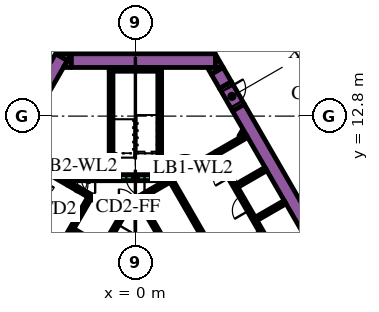
"""IFC4 building model, lengths in metres.
Left out: names, types, materials, properties, quantities, classifications, styles, units other than length and angle.
Written with IfcOpenShell. Run it as: python <this file> out.ifc"""

import sys

from ifc_helpers import new_model, si_unit, direction, frame, frame_2d, origin, place, context, subcontext, project, spatial, polyline, rectangle, outline, extrude, element, fill, save


model = new_model("IFC4")
c1 = context("Model", 3, precision=1e-05, world=origin(), true_north=direction((0.0, 1.0)))
c2 = subcontext(c1, "Body", "Model", "MODEL_VIEW")
j1 = project(units=[si_unit("LENGTHUNIT", "METRE"), si_unit("PLANEANGLEUNIT", "RADIAN")], contexts=[c1])
p1 = place(None, origin())
s1 = spatial("IfcSite", under=j1, at=p1, CompositionType="ELEMENT")
p2 = place(p1, origin())
s2 = spatial("IfcBuilding", under=s1, at=p2, CompositionType="ELEMENT")
p3 = place(p2, frame((0.0, 0.0, 21.6)))
s3 = spatial("IfcBuildingStorey", under=s2, at=p3, CompositionType="ELEMENT", Elevation=21.6)
p4 = place(p3, frame((6.776, 13.364, 0.0), z_axis=(0.0, 0.0, 1.0), x_axis=(0.500004177138, -0.8660229921, 0.0)))
e1 = element("IfcWall", 1, at=p4, inside=s3, PredefinedType="SOLIDWALL", context=c2, shape_type="SweptSolid", body=[
    extrude(rectangle(XDim=20.204, YDim=0.9, at=frame_2d((10.102, 0.0))), origin(), (0.0, 0.0, 1.0), 6.0),
])
p5 = place(p3, frame((-15.36, -1.503, 0.0), z_axis=(0.0, 0.0, 1.0), x_axis=(0.50000389221, 0.866023156604, 0.0)))
e2 = element("IfcWall", 2, at=p5, inside=s3, PredefinedType="SOLIDWALL", context=c2, shape_type="SweptSolid", body=[
    extrude(rectangle(XDim=21.0, YDim=0.9, at=frame_2d((10.5, 0.0))), origin(), (0.0, 0.0, 1.0), 6.0),
])
p6 = place(p3, origin())
e3 = element("IfcWall", 3, at=p6, inside=s3, PredefinedType="SOLIDWALL", context=c2, shape_type="SweptSolid", body=[
    extrude(outline(polyline([(-4.215, 16.9), (-4.469, 16.46), (-5.231, 16.9), (-4.215, 16.9)])), origin(), (0.0, 0.0, 1.0), 6.0),
])
p7 = place(p3, frame((-4.224, 16.45, 0.0), z_axis=(0.0, 0.0, 1.0), x_axis=(1.0, 0.0, 0.0)))
e4 = element("IfcWall", 4, at=p7, inside=s3, PredefinedType="SOLIDWALL", context=c2, shape_type="SweptSolid", body=[
    extrude(rectangle(XDim=9.488, YDim=0.9, at=frame_2d((4.744, 0.0))), origin(), (0.0, 0.0, 1.0), 6.0),
])
e5 = element("IfcWall", 5, at=p6, inside=s3, PredefinedType="SOLIDWALL", context=c2, shape_type="SweptSolid", body=[
    extrude(outline(polyline([(5.265, 16.0), (5.265, 16.88), (5.773, 16.0), (5.265, 16.0)])), origin(), (0.0, 0.0, 1.0), 6.0),
])
e6 = element("IfcWall", 6, at=p6, inside=s3, PredefinedType="SOLIDWALL", context=c2, shape_type="SweptSolid", body=[
    extrude(outline(polyline([(-4.734, 16.0), (-4.226, 16.88), (-4.226, 16.0), (-4.734, 16.0)])), origin(), (0.0, 0.0, 1.0), 6.0),
])
p8 = place(p3, frame((5.926, 14.836, 0.0), z_axis=(0.0, 0.0, 1.0), x_axis=(-0.500076735116, 0.865981096212, 0.0)))
e7 = element("IfcWall", 7, at=p8, inside=s3, PredefinedType="SOLIDWALL", context=c2, shape_type="SweptSolid", body=[
    extrude(rectangle(XDim=1.094, YDim=0.9, at=frame_2d((0.547, 0.0))), origin(), (0.0, 0.0, 1.0), 6.0),
])
e8 = element("IfcWall", 8, at=p6, inside=s3, PredefinedType="SOLIDWALL", context=c2, shape_type="SweptSolid", body=[
    extrude(outline(polyline([(4.734, 16.0), (5.75, 16.0), (4.988, 15.56), (4.734, 16.0)])), origin(), (0.0, 0.0, 1.0), 6.0),
])
p9 = place(p3, frame((-1.725, 15.875, 0.0), z_axis=(0.0, 0.0, 1.0), x_axis=(1.0, 0.0, 0.0)))
e9 = element("IfcWall", 9, at=p9, inside=s3, PredefinedType="SOLIDWALL", context=c2, shape_type="SweptSolid", body=[
    extrude(rectangle(XDim=3.45, YDim=0.25, at=frame_2d((1.725, 0.0))), origin(), (0.0, 0.0, 1.0), 6.0),
])
p10 = place(p3, frame((1.6, 8.95, 0.0), z_axis=(0.0, 0.0, 1.0), x_axis=(0.0, 1.0, 0.0)))
e10 = element("IfcWall", 10, at=p10, inside=s3, PredefinedType="SOLIDWALL", context=c2, shape_type="SweptSolid", body=[
    extrude(rectangle(XDim=6.8, YDim=0.25, at=frame_2d((3.4, 0.0))), origin(), (0.0, 0.0, 1.0), 6.0),
])
p11 = place(p3, frame((1.05, 8.825, 0.0), z_axis=(0.0, 0.0, 1.0), x_axis=(1.0, 0.0, 0.0)))
e11 = element("IfcWall", 11, at=p11, inside=s3, PredefinedType="SOLIDWALL", context=c2, shape_type="SweptSolid", body=[
    extrude(rectangle(XDim=0.675, YDim=0.25, at=frame_2d((0.337, 0.0))), origin(), (0.0, 0.0, 1.0), 6.0),
])
p12 = place(p3, frame((-1.6, 8.7, 0.0), z_axis=(0.0, 0.0, 1.0), x_axis=(0.0, 1.0, 0.0)))
e12 = element("IfcWall", 12, at=p12, inside=s3, PredefinedType="SOLIDWALL", context=c2, shape_type="SweptSolid", body=[
    extrude(rectangle(XDim=7.05, YDim=0.25, at=frame_2d((3.525, 0.0))), origin(), (0.0, 0.0, 1.0), 6.0),
])
p13 = place(p3, frame((-1.475, 8.825, 0.0), z_axis=(0.0, 0.0, 1.0), x_axis=(1.0, 0.0, 0.0)))
e13 = element("IfcWall", 13, at=p13, inside=s3, PredefinedType="SOLIDWALL", context=c2, shape_type="SweptSolid", body=[
    extrude(rectangle(XDim=0.425, YDim=0.25, at=frame_2d((0.212, 0.0))), origin(), (0.0, 0.0, 1.0), 6.0),
])
e14 = element("IfcWall", 14, at=p6, inside=s3, PredefinedType="SOLIDWALL", context=c2, shape_type="SweptSolid", body=[
    extrude(outline(polyline([(0.566, 6.725), (0.566, 6.875), (0.566, 6.875), (0.565, 6.875), (0.361, 6.875), (0.035, 7.439), (0.252, 7.564), (0.377, 7.348), (6.552, -3.348), (6.677, -3.564), (6.46, -3.689), (0.448, 6.725), (0.565, 6.725), (0.566, 6.725), (0.566, 6.725)])), origin(), (0.0, 0.0, 1.0), 6.0),
])
p14 = place(p3, frame((4.358, 9.791, 0.0), z_axis=(0.0, 0.0, 1.0), x_axis=(0.866079547155, 0.499906209203, 0.0)))
e15 = element("IfcWall", 15, at=p14, inside=s3, PredefinedType="SOLIDWALL", context=c2, shape_type="SweptSolid", body=[
    extrude(rectangle(XDim=1.15, YDim=0.25, at=frame_2d((0.575, 0.0))), origin(), (0.0, 0.0, 1.0), 6.0),
])
p15 = place(p3, frame((5.356, 10.367, 0.0), z_axis=(0.0, 0.0, 1.0), x_axis=(0.865978535641, 0.50008116922, 0.0)))
e16 = element("IfcWall", 16, at=p15, inside=s3, PredefinedType="SOLIDWALL", context=c2, shape_type="SweptSolid", body=[
    extrude(rectangle(XDim=2.278, YDim=0.25, at=frame_2d((1.139, 0.0))), origin(), (0.0, 0.0, 1.0), 6.0),
])
p16 = place(p3, frame((0.314, 7.456, 0.0), z_axis=(0.0, 0.0, 1.0), x_axis=(0.866013897511, 0.50001992892, 0.0)))
e17 = element("IfcWall", 17, at=p16, inside=s3, PredefinedType="SOLIDWALL", context=c2, shape_type="SweptSolid", body=[
    extrude(rectangle(XDim=3.268, YDim=0.25, at=frame_2d((1.634, 0.0))), origin(), (0.0, 0.0, 1.0), 6.0),
])
for number, where, z_axis, x_axis in (
    (18, (6.684, 8.224, 0.0), (0.0, 0.0, 1.0), (0.866, 0.5, 0.0)),
    (19, (7.944, 6.041, 0.0), (0.0, 0.0, 1.0), (0.866, 0.5, 0.0)),
):
    element("IfcWall", number, at=place(p3, frame(where, z_axis=z_axis, x_axis=x_axis)), inside=s3, PredefinedType="SOLIDWALL", context=c2, shape_type="SweptSolid", body=[
        extrude(rectangle(XDim=2.2, YDim=0.25, at=frame_2d((1.1, 0.0))), origin(), (0.0, 0.0, 1.0), 6.0),
    ])
p17 = place(p3, frame((-8.06, -1.311, 0.0), z_axis=(0.0, 0.0, 1.0), x_axis=(0.50000273126, 0.866023826885, 0.0)))
e20 = element("IfcWall", 20, at=p17, inside=s3, PredefinedType="SOLIDWALL", context=c2, shape_type="SweptSolid", body=[
    extrude(rectangle(XDim=10.33, YDim=0.25, at=frame_2d((5.165, 0.0))), origin(), (0.0, 0.0, 1.0), 6.0),
])
p18 = place(p3, frame((-1.758, 6.835, 0.0), z_axis=(0.0, 0.0, 1.0), x_axis=(0.865982457891, -0.500074377092, 0.0)))
e21 = element("IfcWall", 21, at=p18, inside=s3, PredefinedType="SOLIDWALL", context=c2, shape_type="SweptSolid", body=[
    extrude(rectangle(XDim=0.2, YDim=0.25, at=frame_2d((0.1, 0.0))), origin(), (0.0, 0.0, 1.0), 6.0),
])
p19 = place(p3, frame((-1.76, 6.836, 0.0), z_axis=(0.0, 0.0, 1.0), x_axis=(-0.865952863304, 0.500125622755, 0.0)))
e22 = element("IfcWall", 22, at=p19, inside=s3, PredefinedType="SOLIDWALL", context=c2, shape_type="SweptSolid", body=[
    extrude(rectangle(XDim=1.258, YDim=0.25, at=frame_2d((0.629, 0.0))), origin(), (0.0, 0.0, 1.0), 6.0),
])
p20 = place(p3, frame((-0.728, 6.24, 0.0), z_axis=(0.0, 0.0, 1.0), x_axis=(-0.865955664968, 0.500120771724, 0.0)))
e23 = element("IfcWall", 23, at=p20, inside=s3, PredefinedType="SOLIDWALL", context=c2, shape_type="SweptSolid", body=[
    extrude(rectangle(XDim=0.778, YDim=0.25, at=frame_2d((0.389, 0.0))), origin(), (0.0, 0.0, 1.0), 6.0),
])
p21 = place(p3, frame((-2.204, 4.182, 0.0), z_axis=(0.0, 0.0, 1.0), x_axis=(-0.866008176907, 0.50002983664, 0.0)))
e24 = element("IfcWall", 24, at=p21, inside=s3, PredefinedType="SOLIDWALL", context=c2, shape_type="SweptSolid", body=[
    extrude(rectangle(XDim=2.2, YDim=0.25, at=frame_2d((1.1, 0.0))), origin(), (0.0, 0.0, 1.0), 6.0),
])
e25 = element("IfcWall", 25, at=p6, inside=s3, PredefinedType="SOLIDWALL", context=c2, shape_type="SweptSolid", body=[
    extrude(outline(polyline([(-3.128, 7.481), (-3.259, 7.557), (-3.134, 7.773), (-3.003, 7.698), (-3.128, 7.481)])), origin(), (0.0, 0.0, 1.0), 6.0),
])
p22 = place(p3, frame((-7.959, 10.415, 0.0), z_axis=(0.0, 0.0, 1.0), x_axis=(0.866020958405, -0.500007699544, 0.0)))
e26 = element("IfcWall", 26, at=p22, inside=s3, PredefinedType="SOLIDWALL", context=c2, shape_type="SweptSolid", body=[
    extrude(rectangle(XDim=4.1, YDim=0.25, at=frame_2d((2.05, 0.0))), origin(), (0.0, 0.0, 1.0), 6.0),
])
p23 = place(p3, frame((-3.997, 8.625, 0.0), z_axis=(0.0, 0.0, 1.0), x_axis=(-1.0, 0.0, 0.0)))
e27 = element("IfcWall", 27, at=p23, inside=s3, PredefinedType="PARTITIONING", context=c2, shape_type="SweptSolid", body=[
    extrude(rectangle(XDim=0.502, YDim=0.15, at=frame_2d((0.251, 0.0))), origin(), (0.0, 0.0, 1.0), 4.85),
])
p24 = place(p3, frame((-2.196, 8.625, 0.0), z_axis=(0.0, 0.0, 1.0), x_axis=(1.0, 0.0, 0.0)))
e28 = element("IfcWall", 28, at=p24, inside=s3, PredefinedType="PARTITIONING", context=c2, shape_type="SweptSolid", body=[
    extrude(rectangle(XDim=1.146, YDim=0.15, at=frame_2d((0.573, 0.0))), origin(), (0.0, 0.0, 1.0), 4.85),
])
p25 = place(p3, frame((1.05, 8.625, 0.0), z_axis=(0.0, 0.0, 1.0), x_axis=(1.0, 0.0, 0.0)))
e29 = element("IfcWall", 29, at=p25, inside=s3, PredefinedType="PARTITIONING", context=c2, shape_type="SweptSolid", body=[
    extrude(rectangle(XDim=0.514, YDim=0.15, at=frame_2d((0.257, 0.0))), origin(), (0.0, 0.0, 1.0), 4.85),
])
p26 = place(p3, frame((6.872, 11.45, 0.0), z_axis=(0.0, 0.0, 1.0), x_axis=(0.499846793097, 0.866113839764, 0.0)))
e30 = element("IfcWall", 30, at=p26, inside=s3, PredefinedType="PARTITIONING", context=c2, shape_type="SweptSolid", body=[
    extrude(rectangle(XDim=0.453, YDim=0.15, at=frame_2d((0.227, 0.0))), origin(), (0.0, 0.0, 1.0), 4.85),
])
p27 = place(p3, frame((7.131, 11.6, 0.0), z_axis=(0.0, 0.0, 1.0), x_axis=(0.498600033135, 0.866832167699, 0.0)))
e31 = element("IfcWall", 31, at=p27, inside=s3, PredefinedType="PARTITIONING", context=c2, shape_type="SweptSolid", body=[
    extrude(rectangle(XDim=0.107, YDim=0.15, at=frame_2d((0.053, 0.0))), origin(), (0.0, 0.0, 1.0), 4.85),
])
p28 = place(p3, frame((11.553, -0.46, 0.0), z_axis=(0.0, 0.0, 1.0), x_axis=(-0.500006514828, 0.866021642414, 0.0)))
e32 = element("IfcWall", 32, at=p28, inside=s3, PredefinedType="SOLIDWALL", context=c2, shape_type="SweptSolid", body=[
    extrude(rectangle(XDim=12.35, YDim=0.25, at=frame_2d((6.175, 0.0))), origin(), (0.0, 0.0, 1.0), 6.0),
])
p29 = place(p28, frame((0.585, 0.0, 0.0)))
e33 = element("IfcOpeningElement", 33, at=p29, cuts=e32, PredefinedType="OPENING", context=c2, shape_type="SweptSolid", body=[
    extrude(rectangle(XDim=1.1, YDim=2.1, at=frame_2d((0.55, 1.05))), frame((0.0, 0.135, 0.0), z_axis=(0.0, -1.0, 0.0), x_axis=(1.0, 0.0, 0.0)), (0.0, 0.0, 1.0), 0.27),
])
p30 = place(p28, frame((3.105, 0.0, 0.0)))
e34 = element("IfcOpeningElement", 34, at=p30, cuts=e32, PredefinedType="OPENING", context=c2, shape_type="SweptSolid", body=[
    extrude(rectangle(XDim=1.1, YDim=2.1, at=frame_2d((0.55, 1.05))), frame((0.0, 0.135, 0.0), z_axis=(0.0, -1.0, 0.0), x_axis=(1.0, 0.0, 0.0)), (0.0, 0.0, 1.0), 0.27),
])
p31 = place(p28, frame((5.625, 0.0, 0.0)))
e35 = element("IfcOpeningElement", 35, at=p31, cuts=e32, PredefinedType="OPENING", context=c2, shape_type="SweptSolid", body=[
    extrude(rectangle(XDim=1.1, YDim=2.1, at=frame_2d((0.55, 1.05))), frame((0.0, 0.135, 0.0), z_axis=(0.0, -1.0, 0.0), x_axis=(1.0, 0.0, 0.0)), (0.0, 0.0, 1.0), 0.27),
])
p32 = place(p28, frame((8.145, 0.0, 0.0)))
e36 = element("IfcOpeningElement", 36, at=p32, cuts=e32, PredefinedType="OPENING", context=c2, shape_type="SweptSolid", body=[
    extrude(rectangle(XDim=1.1, YDim=2.1, at=frame_2d((0.55, 1.05))), frame((0.0, 0.135, 0.0), z_axis=(0.0, -1.0, 0.0), x_axis=(1.0, 0.0, 0.0)), (0.0, 0.0, 1.0), 0.27),
])
p33 = place(p28, frame((10.665, 0.0, 0.0)))
e37 = element("IfcOpeningElement", 37, at=p33, cuts=e32, PredefinedType="OPENING", context=c2, shape_type="SweptSolid", body=[
    extrude(rectangle(XDim=1.1, YDim=2.1, at=frame_2d((0.55, 1.05))), frame((0.0, 0.135, 0.0), z_axis=(0.0, -1.0, 0.0), x_axis=(1.0, 0.0, 0.0)), (0.0, 0.0, 1.0), 0.27),
])
p34 = place(p3, frame((8.565, -2.185, 0.0), z_axis=(0.0, 0.0, 1.0), x_axis=(-0.499997954832, 0.866026584559, 0.0)))
e38 = element("IfcWall", 38, at=p34, inside=s3, PredefinedType="SOLIDWALL", context=c2, shape_type="SweptSolid", body=[
    extrude(rectangle(XDim=12.35, YDim=0.25, at=frame_2d((6.175, 0.0))), origin(), (0.0, 0.0, 1.0), 6.0),
])
p35 = place(p34, frame((5.725, 0.0, 0.0)))
e39 = element("IfcOpeningElement", 39, at=p35, cuts=e38, PredefinedType="OPENING", context=c2, shape_type="SweptSolid", body=[
    extrude(rectangle(XDim=0.9, YDim=2.1, at=frame_2d((0.45, 1.05))), frame((0.0, 0.135, 0.0), z_axis=(0.0, -1.0, 0.0), x_axis=(1.0, 0.0, 0.0)), (0.0, 0.0, 1.0), 0.27),
])
p36 = place(p3, frame((-0.898, 6.194, 0.0), z_axis=(0.0, 0.0, 1.0), x_axis=(-0.499996202215, -0.866027596426, 0.0)))
e40 = element("IfcWall", 40, at=p36, inside=s3, PredefinedType="SOLIDWALL", context=c2, shape_type="SweptSolid", body=[
    extrude(rectangle(XDim=9.83, YDim=0.25, at=frame_2d((4.915, 0.0))), origin(), (0.0, 0.0, 1.0), 6.0),
])
p37 = place(p36, frame((0.585, 0.0, 0.0)))
e41 = element("IfcOpeningElement", 41, at=p37, cuts=e40, PredefinedType="OPENING", context=c2, shape_type="SweptSolid", body=[
    extrude(rectangle(XDim=1.1, YDim=2.1, at=frame_2d((0.55, 1.05))), frame((0.0, 0.135, 0.0), z_axis=(0.0, -1.0, 0.0), x_axis=(1.0, 0.0, 0.0)), (0.0, 0.0, 1.0), 0.27),
])
p38 = place(p36, frame((3.105, 0.0, 0.0)))
e42 = element("IfcOpeningElement", 42, at=p38, cuts=e40, PredefinedType="OPENING", context=c2, shape_type="SweptSolid", body=[
    extrude(rectangle(XDim=1.1, YDim=2.1, at=frame_2d((0.55, 1.05))), frame((0.0, 0.135, 0.0), z_axis=(0.0, -1.0, 0.0), x_axis=(1.0, 0.0, 0.0)), (0.0, 0.0, 1.0), 0.27),
])
p39 = place(p36, frame((5.625, 0.0, 0.0)))
e43 = element("IfcOpeningElement", 43, at=p39, cuts=e40, PredefinedType="OPENING", context=c2, shape_type="SweptSolid", body=[
    extrude(rectangle(XDim=1.1, YDim=2.1, at=frame_2d((0.55, 1.05))), frame((0.0, 0.135, 0.0), z_axis=(0.0, -1.0, 0.0), x_axis=(1.0, 0.0, 0.0)), (0.0, 0.0, 1.0), 0.27),
])
p40 = place(p36, frame((8.145, 0.0, 0.0)))
e44 = element("IfcOpeningElement", 44, at=p40, cuts=e40, PredefinedType="OPENING", context=c2, shape_type="SweptSolid", body=[
    extrude(rectangle(XDim=1.1, YDim=2.1, at=frame_2d((0.55, 1.05))), frame((0.0, 0.135, 0.0), z_axis=(0.0, -1.0, 0.0), x_axis=(1.0, 0.0, 0.0)), (0.0, 0.0, 1.0), 0.27),
])
p41 = place(p3, frame((1.05, 8.75, 0.0), z_axis=(0.0, 0.0, 1.0), x_axis=(-1.0, 0.0, 0.0)))
e45 = element("IfcWall", 45, at=p41, inside=s3, PredefinedType="SOLIDWALL", context=c2, shape_type="SweptSolid", body=[
    extrude(rectangle(XDim=2.1, YDim=0.4, at=frame_2d((1.05, 0.0))), origin(), (0.0, 0.0, 1.0), 6.0),
])
p42 = place(p41, frame((0.45, 0.0, 0.0)))
e46 = element("IfcOpeningElement", 46, at=p42, cuts=e45, PredefinedType="OPENING", context=c2, shape_type="SweptSolid", body=[
    extrude(rectangle(XDim=1.2, YDim=2.1, at=frame_2d((0.6, 1.05))), frame((0.0, 0.21, 0.0), z_axis=(0.0, -1.0, 0.0), x_axis=(1.0, 0.0, 0.0)), (0.0, 0.0, 1.0), 0.42),
])
p43 = place(p3, frame((-2.196, 8.625, 0.0), z_axis=(0.0, 0.0, 1.0), x_axis=(-1.0, 0.0, 0.0)))
e47 = element("IfcWall", 47, at=p43, inside=s3, PredefinedType="PARTITIONING", context=c2, shape_type="SweptSolid", body=[
    extrude(rectangle(XDim=1.8, YDim=0.15, at=frame_2d((0.9, 0.0))), origin(), (0.0, 0.0, 1.0), 4.85),
])
p44 = place(p43, frame((0.45, 0.0, 0.0)))
e48 = element("IfcOpeningElement", 48, at=p44, cuts=e47, PredefinedType="OPENING", context=c2, shape_type="SweptSolid", body=[
    extrude(rectangle(XDim=0.9, YDim=2.1, at=frame_2d((0.45, 1.05))), frame((0.0, 0.085, 0.0), z_axis=(0.0, -1.0, 0.0), x_axis=(1.0, 0.0, 0.0)), (0.0, 0.0, 1.0), 0.17),
])
p45 = place(p3, frame((-1.534, 6.8, 0.0), z_axis=(0.0, 0.0, 1.0), x_axis=(1.0, 0.0, 0.0)))
e49 = element("IfcWall", 49, at=p45, inside=s3, PredefinedType="PARTITIONING", context=c2, shape_type="SweptSolid", body=[
    extrude(rectangle(XDim=2.1, YDim=0.15, at=frame_2d((1.05, 0.0))), origin(), (0.0, 0.0, 1.0), 4.85),
])
p46 = place(p45, frame((0.45, 0.0, 0.0)))
e50 = element("IfcOpeningElement", 50, at=p46, cuts=e49, PredefinedType="OPENING", context=c2, shape_type="SweptSolid", body=[
    extrude(rectangle(XDim=1.2, YDim=2.1, at=frame_2d((0.6, 1.05))), frame((0.0, 0.085, 0.0), z_axis=(0.0, -1.0, 0.0), x_axis=(1.0, 0.0, 0.0)), (0.0, 0.0, 1.0), 0.17),
])
p47 = place(p3, frame((3.183, 9.02, 0.0), z_axis=(0.0, 0.0, 1.0), x_axis=(0.866034573852, 0.49998411664, 0.0)))
e51 = element("IfcWall", 51, at=p47, inside=s3, PredefinedType="PARTITIONING", context=c2, shape_type="SweptSolid", body=[
    extrude(rectangle(XDim=1.4, YDim=0.09, at=frame_2d((0.7, 0.0))), origin(), (0.0, 0.0, 1.0), 4.85),
])
p48 = place(p47, frame((0.1, 0.0, 0.0)))
e52 = element("IfcOpeningElement", 52, at=p48, cuts=e51, PredefinedType="OPENING", context=c2, shape_type="SweptSolid", body=[
    extrude(rectangle(XDim=1.2, YDim=2.1, at=frame_2d((0.6, 1.05))), frame((0.0, 0.055, 0.0), z_axis=(0.0, -1.0, 0.0), x_axis=(1.0, 0.0, 0.0)), (0.0, 0.0, 1.0), 0.11),
])
p49 = place(p3, frame((-4.409, 8.365, 0.0), z_axis=(0.0, 0.0, 1.0), x_axis=(0.866034573852, -0.49998411664, 0.0)))
e53 = element("IfcWall", 53, at=p49, inside=s3, PredefinedType="SOLIDWALL", context=c2, shape_type="SweptSolid", body=[
    extrude(rectangle(XDim=1.4, YDim=0.25, at=frame_2d((0.7, 0.0))), origin(), (0.0, 0.0, 1.0), 6.0),
])
p50 = place(p49, frame((0.1, 0.0, 0.0)))
e54 = element("IfcOpeningElement", 54, at=p50, cuts=e53, PredefinedType="OPENING", context=c2, shape_type="SweptSolid", body=[
    extrude(rectangle(XDim=1.2, YDim=2.1, at=frame_2d((0.6, 1.05))), frame((0.0, 0.135, 0.0), z_axis=(0.0, -1.0, 0.0), x_axis=(1.0, 0.0, 0.0)), (0.0, 0.0, 1.0), 0.27),
])
p51 = place(p3, frame((5.926, 14.836, 0.0), z_axis=(0.0, 0.0, 1.0), x_axis=(0.500062241894, -0.865989465428, 0.0)))
e55 = element("IfcWall", 55, at=p51, inside=s3, PredefinedType="SOLIDWALL", context=c2, shape_type="SweptSolid", body=[
    extrude(rectangle(XDim=1.7, YDim=0.9, at=frame_2d((0.85, 0.0))), origin(), (0.0, 0.0, 1.0), 6.0),
])
p52 = place(p51, frame((0.25, 0.0, 0.0)))
e56 = element("IfcOpeningElement", 56, at=p52, cuts=e55, PredefinedType="OPENING", context=c2, shape_type="SweptSolid", body=[
    extrude(rectangle(XDim=1.2, YDim=2.1, at=frame_2d((0.6, 1.05))), frame((0.0, 0.46, 0.0), z_axis=(0.0, -1.0, 0.0), x_axis=(1.0, 0.0, 0.0)), (0.0, 0.0, 1.0), 0.92),
])
p53 = place(p3, frame((38.25, -14.145, 0.0), z_axis=(0.0, 0.0, 1.0), x_axis=(-0.500000527961, 0.866025098966, 0.0)))
e57 = element("IfcWall", 57, at=p53, inside=s3, PredefinedType="SOLIDWALL", context=c2, shape_type="SweptSolid", body=[
    extrude(rectangle(XDim=62.75, YDim=0.25, at=frame_2d((31.375, 0.0))), origin(), (0.0, 0.0, 1.0), 4.5),
])
p54 = place(p31, origin())
e58 = element("IfcDoor", 58, at=p54, inside=s3, OperationType="DOUBLE_DOOR_SLIDING", PredefinedType="DOOR", context=c2, shape_type="SweptSolid", body=[
    extrude(rectangle(XDim=1.1, YDim=2.1, at=frame_2d((0.55, 1.05))), frame((0.0, 0.025, 0.0), z_axis=(0.0, -1.0, 0.0), x_axis=(1.0, 0.0, 0.0)), (0.0, 0.0, 1.0), 0.05),
])
fill(e35, e58)
p55 = place(p32, origin())
e59 = element("IfcDoor", 59, at=p55, inside=s3, OperationType="DOUBLE_DOOR_SLIDING", PredefinedType="DOOR", context=c2, shape_type="SweptSolid", body=[
    extrude(rectangle(XDim=1.1, YDim=2.1, at=frame_2d((0.55, 1.05))), frame((0.0, 0.025, 0.0), z_axis=(0.0, -1.0, 0.0), x_axis=(1.0, 0.0, 0.0)), (0.0, 0.0, 1.0), 0.05),
])
fill(e36, e59)
p56 = place(p33, origin())
e60 = element("IfcDoor", 60, at=p56, inside=s3, OperationType="DOUBLE_DOOR_SLIDING", PredefinedType="DOOR", context=c2, shape_type="SweptSolid", body=[
    extrude(rectangle(XDim=1.1, YDim=2.1, at=frame_2d((0.55, 1.05))), frame((0.0, 0.025, 0.0), z_axis=(0.0, -1.0, 0.0), x_axis=(1.0, 0.0, 0.0)), (0.0, 0.0, 1.0), 0.05),
])
fill(e37, e60)
p57 = place(p37, origin())
e61 = element("IfcDoor", 61, at=p57, inside=s3, OperationType="DOUBLE_DOOR_SLIDING", PredefinedType="DOOR", context=c2, shape_type="SweptSolid", body=[
    extrude(rectangle(XDim=1.1, YDim=2.1, at=frame_2d((0.55, 1.05))), frame((0.0, 0.025, 0.0), z_axis=(0.0, -1.0, 0.0), x_axis=(1.0, 0.0, 0.0)), (0.0, 0.0, 1.0), 0.05),
])
fill(e41, e61)
p58 = place(p42, origin())
e62 = element("IfcDoor", 62, at=p58, inside=s3, OperationType="SINGLE_SWING_LEFT", PredefinedType="DOOR", context=c2, shape_type="SweptSolid", body=[
    extrude(rectangle(XDim=1.2, YDim=2.1, at=frame_2d((0.6, 1.05))), frame((0.0, 0.025, 0.0), z_axis=(0.0, -1.0, 0.0), x_axis=(1.0, 0.0, 0.0)), (0.0, 0.0, 1.0), 0.05),
])
fill(e46, e62)
p59 = place(p44, origin())
e63 = element("IfcDoor", 63, at=p59, inside=s3, OperationType="SINGLE_SWING_LEFT", PredefinedType="DOOR", context=c2, shape_type="SweptSolid", body=[
    extrude(rectangle(XDim=0.9, YDim=2.1, at=frame_2d((0.45, 1.05))), frame((0.0, 0.025, 0.0), z_axis=(0.0, -1.0, 0.0), x_axis=(1.0, 0.0, 0.0)), (0.0, 0.0, 1.0), 0.05),
])
fill(e48, e63)
p60 = place(p46, origin())
e64 = element("IfcDoor", 64, at=p60, inside=s3, OperationType="SINGLE_SWING_LEFT", PredefinedType="DOOR", context=c2, shape_type="SweptSolid", body=[
    extrude(rectangle(XDim=1.2, YDim=2.1, at=frame_2d((0.6, 1.05))), frame((0.0, 0.025, 0.0), z_axis=(0.0, -1.0, 0.0), x_axis=(1.0, 0.0, 0.0)), (0.0, 0.0, 1.0), 0.05),
])
fill(e50, e64)
p61 = place(p48, origin())
e65 = element("IfcDoor", 65, at=p61, inside=s3, OperationType="SINGLE_SWING_LEFT", PredefinedType="DOOR", context=c2, shape_type="SweptSolid", body=[
    extrude(rectangle(XDim=1.2, YDim=2.1, at=frame_2d((0.6, 1.05))), frame((0.0, 0.025, 0.0), z_axis=(0.0, -1.0, 0.0), x_axis=(1.0, 0.0, 0.0)), (0.0, 0.0, 1.0), 0.05),
])
fill(e52, e65)
p62 = place(p50, origin())
e66 = element("IfcDoor", 66, at=p62, inside=s3, OperationType="SINGLE_SWING_LEFT", PredefinedType="DOOR", context=c2, shape_type="SweptSolid", body=[
    extrude(rectangle(XDim=1.2, YDim=2.1, at=frame_2d((0.6, 1.05))), frame((0.0, 0.025, 0.0), z_axis=(0.0, -1.0, 0.0), x_axis=(1.0, 0.0, 0.0)), (0.0, 0.0, 1.0), 0.05),
])
fill(e54, e66)
p63 = place(p52, origin())
e67 = element("IfcDoor", 67, at=p63, inside=s3, OperationType="SINGLE_SWING_LEFT", PredefinedType="DOOR", context=c2, shape_type="SweptSolid", body=[
    extrude(rectangle(XDim=1.2, YDim=2.1, at=frame_2d((0.6, 1.05))), frame((0.0, 0.025, 0.0), z_axis=(0.0, -1.0, 0.0), x_axis=(1.0, 0.0, 0.0)), (0.0, 0.0, 1.0), 0.05),
])
fill(e56, e67)
save(model, sys.argv[1])
